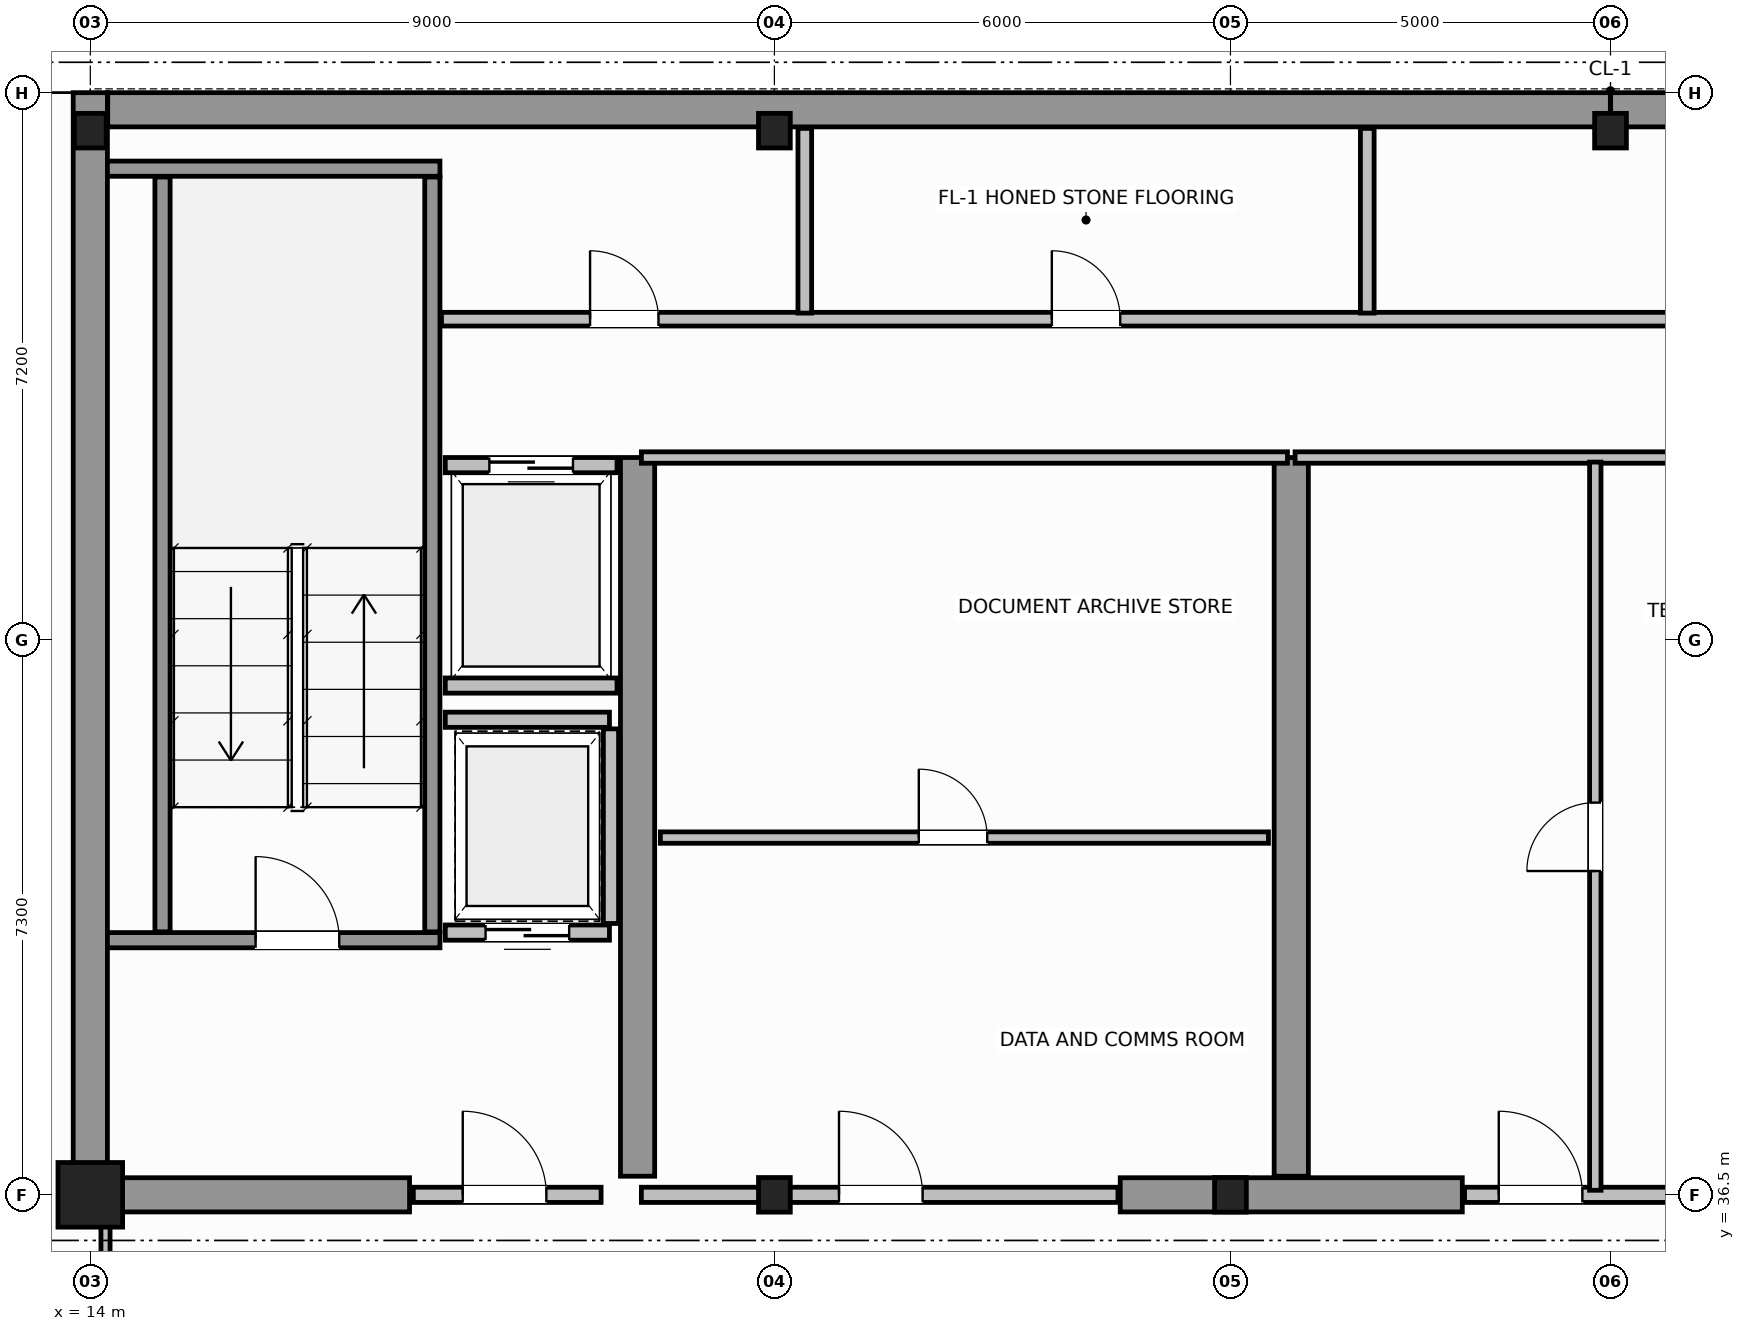
"""IFC4 building model, lengths in metres.
Left out: names, types, materials, properties, quantities, classifications, styles, units other than length and angle.
Written with IfcOpenShell. Run it as: python <this file> out.ifc"""

import sys

from ifc_helpers import new_model, si_unit, direction, frame, frame_2d, origin, origin_2d, place, context, subcontext, project, spatial, rectangle, i_section, extrude, source, transform, mapped, element, fill, save


model = new_model("IFC4")
c1 = context("Model", 3, precision=1e-05, world=origin(), true_north=direction((0.0, 1.0)))
c2 = subcontext(c1, "Body", "Model", "MODEL_VIEW")
j1 = project(units=[si_unit("LENGTHUNIT", "METRE"), si_unit("PLANEANGLEUNIT", "RADIAN")], contexts=[c1])
p1 = place(None, origin())
s1 = spatial("IfcSite", under=j1, at=p1, CompositionType="ELEMENT")
p2 = place(p1, origin())
s2 = spatial("IfcBuilding", under=s1, at=p2, CompositionType="ELEMENT")
p3 = place(p2, frame((0.0, 0.0, 268.8)))
s3 = spatial("IfcBuildingStorey", under=s2, at=p3, CompositionType="ELEMENT", Elevation=268.8)
m1 = source(origin(), c2, "Body", "SweptSolid", [
    extrude(rectangle(XDim=0.85, YDim=0.85, at=origin_2d()), origin(), (0.0, 0.0, 1.0), 3.8),
])
p4 = place(p3, frame((14.0, 36.5, 0.0), z_axis=(0.0, 0.0, 1.0), x_axis=(1.0, 0.0, 0.0)))
e1 = element("IfcColumn", 1, at=p4, inside=s3, PredefinedType="COLUMN", context=c2, shape_type="MappedRepresentation", body=[
    mapped(m1, transform((0.0, 0.0, 0.0), scale=1.0)),
])
m2 = source(origin(), c2, "Body", "SweptSolid", [
    extrude(i_section(OverallWidth=0.418, OverallDepth=0.455, WebThickness=0.042, FlangeThickness=0.058, FilletRadius=0.015, at=origin_2d()), origin(), (0.0, 0.0, 1.0), 3.8),
])
for number, where, z_axis, x_axis in (
    (2, (23.0, 36.5, 0.0), (0.0, 0.0, 1.0), (1.0, 0.0, 0.0)),
    (3, (29.0, 36.5, 0.0), (0.0, 0.0, 1.0), (1.0, 0.0, 0.0)),
    (4, (14.0, 50.5, 0.0), (0.0, 0.0, 1.0), (1.0, 0.0, 0.0)),
    (5, (23.0, 50.5, 0.0), (0.0, 0.0, 1.0), (1.0, 0.0, 0.0)),
    (6, (34.0, 50.5, 0.0), (0.0, 0.0, 1.0), (1.0, 0.0, 0.0)),
):
    element("IfcColumn", number, at=place(p3, frame(where, z_axis=z_axis, x_axis=x_axis)), inside=s3, PredefinedType="COLUMN", context=c2, shape_type="MappedRepresentation", body=[
        mapped(m2, transform((0.0, 0.0, 0.0), scale=1.0)),
    ])
for number, where, z_axis, x_axis in (
    (7, (14.229, 50.775, 0.0), (0.0, 0.0, 1.0), (1.0, 0.0, 0.0)),
    (8, (34.002, 50.775, 0.0), (0.0, 0.0, 1.0), (1.0, 0.0, 0.0)),
):
    element("IfcWall", number, at=place(p3, frame(where, z_axis=z_axis, x_axis=x_axis)), inside=s3, PredefinedType="SHEAR", context=c2, shape_type="SweptSolid", body=[
        extrude(rectangle(XDim=19.769, YDim=0.45, at=frame_2d((9.885, 0.0))), origin(), (0.0, 0.0, 1.0), 3.8),
    ])
p5 = place(p3, frame((14.0, 36.5, 0.0), z_axis=(0.0, 0.0, 1.0), x_axis=(0.0, 1.0, 0.0)))
e9 = element("IfcWall", 9, at=p5, inside=s3, PredefinedType="SHEAR", context=c2, shape_type="SweptSolid", body=[
    extrude(rectangle(XDim=14.5, YDim=0.45, at=frame_2d((7.25, 0.0))), origin(), (0.0, 0.0, 1.0), 3.8),
])
p6 = place(p3, frame((14.245, 36.5, 0.0), z_axis=(0.0, 0.0, 1.0), x_axis=(1.0, 0.0, 0.0)))
e10 = element("IfcWall", 10, at=p6, inside=s3, PredefinedType="SHEAR", context=c2, shape_type="SweptSolid", body=[
    extrude(rectangle(XDim=3.955, YDim=0.45, at=frame_2d((1.978, 0.0))), origin(), (0.0, 0.0, 1.0), 2.58),
])
p7 = place(p3, frame((27.55, 36.5, 0.0), z_axis=(0.0, 0.0, 1.0), x_axis=(1.0, 0.0, 0.0)))
e11 = element("IfcWall", 11, at=p7, inside=s3, PredefinedType="SHEAR", context=c2, shape_type="SweptSolid", body=[
    extrude(rectangle(XDim=4.5, YDim=0.45, at=frame_2d((2.25, 0.0))), origin(), (0.0, 0.0, 1.0), 3.8),
])
for number, where, z_axis, x_axis in (
    (12, (21.2, 36.745, 0.0), (0.0, 0.0, 1.0), (0.0, 1.0, 0.0)),
    (13, (29.8, 36.745, 0.0), (0.0, 0.0, 1.0), (0.0, 1.0, 0.0)),
):
    element("IfcWall", number, at=place(p3, frame(where, z_axis=z_axis, x_axis=x_axis)), inside=s3, PredefinedType="SHEAR", context=c2, shape_type="SweptSolid", body=[
        extrude(rectangle(XDim=9.455, YDim=0.45, at=frame_2d((4.728, 0.0))), origin(), (0.0, 0.0, 1.0), 3.8),
    ])
p8 = place(p3, frame((14.225, 39.85, 0.0), z_axis=(0.0, 0.0, 1.0), x_axis=(1.0, 0.0, 0.0)))
e14 = element("IfcWall", 14, at=p8, inside=s3, PredefinedType="SOLIDWALL", context=c2, shape_type="SweptSolid", body=[
    extrude(rectangle(XDim=4.375, YDim=0.2, at=frame_2d((2.188, 0.0))), origin(), (0.0, 0.0, 1.0), 3.8),
])
p9 = place(p8, frame((1.95, 0.0, 0.0)))
e15 = element("IfcOpeningElement", 15, at=p9, cuts=e14, PredefinedType="OPENING", context=c2, shape_type="SweptSolid", body=[
    extrude(rectangle(XDim=1.1, YDim=2.15, at=frame_2d((0.55, 1.075))), frame((0.0, 0.11, 0.0), z_axis=(0.0, -1.0, 0.0), x_axis=(1.0, 0.0, 0.0)), (0.0, 0.0, 1.0), 0.22),
])
p10 = place(p3, frame((14.225, 50.0, 0.0), z_axis=(0.0, 0.0, 1.0), x_axis=(1.0, 0.0, 0.0)))
e16 = element("IfcWall", 16, at=p10, inside=s3, PredefinedType="SOLIDWALL", context=c2, shape_type="SweptSolid", body=[
    extrude(rectangle(XDim=4.375, YDim=0.2, at=frame_2d((2.188, 0.0))), origin(), (0.0, 0.0, 1.0), 3.8),
])
for number, where, z_axis, x_axis in (
    (17, (14.95, 39.96, 0.0), (0.0, 0.0, 1.0), (0.0, 1.0, 0.0)),
    (18, (18.5, 39.96, 0.0), (0.0, 0.0, 1.0), (0.0, 1.0, 0.0)),
):
    element("IfcWall", number, at=place(p3, frame(where, z_axis=z_axis, x_axis=x_axis)), inside=s3, PredefinedType="SOLIDWALL", context=c2, shape_type="SweptSolid", body=[
        extrude(rectangle(XDim=9.93, YDim=0.2, at=frame_2d((4.965, 0.0))), origin(), (0.0, 0.0, 1.0), 3.8),
    ])
p11 = place(p3, frame((18.25, 36.5, 0.0), z_axis=(0.0, 0.0, 1.0), x_axis=(1.0, 0.0, 0.0)))
e19 = element("IfcWall", 19, at=p11, inside=s3, PredefinedType="SOLIDWALL", context=c2, shape_type="SweptSolid", body=[
    extrude(rectangle(XDim=2.47, YDim=0.2, at=frame_2d((1.235, 0.0))), origin(), (0.0, 0.0, 1.0), 2.57),
])
p12 = place(p11, frame((0.65, 0.0, 0.0)))
e20 = element("IfcOpeningElement", 20, at=p12, cuts=e19, PredefinedType="OPENING", context=c2, shape_type="SweptSolid", body=[
    extrude(rectangle(XDim=1.1, YDim=2.15, at=frame_2d((0.55, 1.075))), frame((0.0, 0.11, 0.0), z_axis=(0.0, -1.0, 0.0), x_axis=(1.0, 0.0, 0.0)), (0.0, 0.0, 1.0), 0.22),
])
p13 = place(p3, frame((18.67, 46.1, 0.0), z_axis=(0.0, 0.0, 1.0), x_axis=(1.0, 0.0, 0.0)))
e21 = element("IfcWall", 21, at=p13, inside=s3, PredefinedType="SOLIDWALL", context=c2, shape_type="SweptSolid", body=[
    extrude(rectangle(XDim=2.26, YDim=0.2, at=frame_2d((1.13, 0.0))), origin(), (0.0, 0.0, 1.0), 3.58),
])
p14 = place(p13, frame((0.58, 0.0, 0.0)))
e22 = element("IfcOpeningElement", 22, at=p14, cuts=e21, PredefinedType="OPENING", context=c2, shape_type="SweptSolid", body=[
    extrude(rectangle(XDim=1.1, YDim=2.15, at=frame_2d((0.55, 1.075))), frame((0.0, 0.11, 0.0), z_axis=(0.0, -1.0, 0.0), x_axis=(1.0, 0.0, 0.0)), (0.0, 0.0, 1.0), 0.22),
])
p15 = place(p3, frame((18.67, 43.2, 0.0), z_axis=(0.0, 0.0, 1.0), x_axis=(1.0, 0.0, 0.0)))
e23 = element("IfcWall", 23, at=p15, inside=s3, PredefinedType="SOLIDWALL", context=c2, shape_type="SweptSolid", body=[
    extrude(rectangle(XDim=2.26, YDim=0.2, at=frame_2d((1.13, 0.0))), origin(), (0.0, 0.0, 1.0), 3.58),
])
p16 = place(p3, frame((18.67, 39.95, 0.0), z_axis=(0.0, 0.0, 1.0), x_axis=(1.0, 0.0, 0.0)))
e24 = element("IfcWall", 24, at=p16, inside=s3, PredefinedType="SOLIDWALL", context=c2, shape_type="SweptSolid", body=[
    extrude(rectangle(XDim=2.16, YDim=0.2, at=frame_2d((1.08, 0.0))), origin(), (0.0, 0.0, 1.0), 3.58),
])
p17 = place(p16, frame((0.53, 0.0, 0.0)))
e25 = element("IfcOpeningElement", 25, at=p17, cuts=e24, PredefinedType="OPENING", context=c2, shape_type="SweptSolid", body=[
    extrude(rectangle(XDim=1.1, YDim=2.15, at=frame_2d((0.55, 1.075))), frame((0.0, 0.11, 0.0), z_axis=(0.0, -1.0, 0.0), x_axis=(1.0, 0.0, 0.0)), (0.0, 0.0, 1.0), 0.22),
])
p18 = place(p3, frame((18.67, 42.75, 0.0), z_axis=(0.0, 0.0, 1.0), x_axis=(1.0, 0.0, 0.0)))
e26 = element("IfcWall", 26, at=p18, inside=s3, PredefinedType="SOLIDWALL", context=c2, shape_type="SweptSolid", body=[
    extrude(rectangle(XDim=2.16, YDim=0.2, at=frame_2d((1.08, 0.0))), origin(), (0.0, 0.0, 1.0), 3.58),
])
p19 = place(p3, frame((20.85, 40.07, 0.0), z_axis=(0.0, 0.0, 1.0), x_axis=(0.0, 1.0, 0.0)))
e27 = element("IfcWall", 27, at=p19, inside=s3, PredefinedType="SOLIDWALL", context=c2, shape_type="SweptSolid", body=[
    extrude(rectangle(XDim=2.56, YDim=0.2, at=frame_2d((1.28, 0.0))), origin(), (0.0, 0.0, 1.0), 3.58),
])
p20 = place(p3, frame((21.25, 36.5, 0.0), z_axis=(0.0, 0.0, 1.0), x_axis=(1.0, 0.0, 0.0)))
e28 = element("IfcWall", 28, at=p20, inside=s3, PredefinedType="SOLIDWALL", context=c2, shape_type="SweptSolid", body=[
    extrude(rectangle(XDim=6.27, YDim=0.2, at=frame_2d((3.135, 0.0))), origin(), (0.0, 0.0, 1.0), 2.57),
])
p21 = place(p20, frame((2.6, 0.0, 0.0)))
e29 = element("IfcOpeningElement", 29, at=p21, cuts=e28, PredefinedType="OPENING", context=c2, shape_type="SweptSolid", body=[
    extrude(rectangle(XDim=1.1, YDim=2.15, at=frame_2d((0.55, 1.075))), frame((0.0, 0.11, 0.0), z_axis=(0.0, -1.0, 0.0), x_axis=(1.0, 0.0, 0.0)), (0.0, 0.0, 1.0), 0.22),
])
p22 = place(p3, frame((21.25, 46.2, 0.0), z_axis=(0.0, 0.0, 1.0), x_axis=(1.0, 0.0, 0.0)))
e30 = element("IfcWall", 30, at=p22, inside=s3, PredefinedType="PARTITIONING", context=c2, shape_type="SweptSolid", body=[
    extrude(rectangle(XDim=8.5, YDim=0.15, at=frame_2d((4.25, 0.0))), origin(), (0.0, 0.0, 1.0), 3.58),
])
p23 = place(p3, frame((21.5, 41.2, 0.0), z_axis=(0.0, 0.0, 1.0), x_axis=(1.0, 0.0, 0.0)))
e31 = element("IfcWall", 31, at=p23, inside=s3, PredefinedType="PARTITIONING", context=c2, shape_type="SweptSolid", body=[
    extrude(rectangle(XDim=8.0, YDim=0.15, at=frame_2d((4.0, 0.0))), origin(), (0.0, 0.0, 1.0), 3.58),
])
p24 = place(p23, frame((3.4, 0.0, 0.0)))
e32 = element("IfcOpeningElement", 32, at=p24, cuts=e31, PredefinedType="OPENING", context=c2, shape_type="SweptSolid", body=[
    extrude(rectangle(XDim=0.9, YDim=2.1, at=frame_2d((0.45, 1.05))), frame((0.0, 0.085, 0.0), z_axis=(0.0, -1.0, 0.0), x_axis=(1.0, 0.0, 0.0)), (0.0, 0.0, 1.0), 0.17),
])
p25 = place(p3, frame((32.08, 36.5, 0.0), z_axis=(0.0, 0.0, 1.0), x_axis=(1.0, 0.0, 0.0)))
e33 = element("IfcWall", 33, at=p25, inside=s3, PredefinedType="SOLIDWALL", context=c2, shape_type="SweptSolid", body=[
    extrude(rectangle(XDim=4.04, YDim=0.2, at=frame_2d((2.02, 0.0))), origin(), (0.0, 0.0, 1.0), 3.02),
])
p26 = place(p25, frame((0.45, 0.0, 0.0)))
e34 = element("IfcOpeningElement", 34, at=p26, cuts=e33, PredefinedType="OPENING", context=c2, shape_type="SweptSolid", body=[
    extrude(rectangle(XDim=1.1, YDim=2.15, at=frame_2d((0.55, 1.075))), frame((0.0, 0.11, 0.0), z_axis=(0.0, -1.0, 0.0), x_axis=(1.0, 0.0, 0.0)), (0.0, 0.0, 1.0), 0.22),
])
p27 = place(p3, frame((29.85, 46.2, 0.0), z_axis=(0.0, 0.0, 1.0), x_axis=(1.0, 0.0, 0.0)))
e35 = element("IfcWall", 35, at=p27, inside=s3, PredefinedType="PARTITIONING", context=c2, shape_type="SweptSolid", body=[
    extrude(rectangle(XDim=8.5, YDim=0.15, at=frame_2d((4.25, 0.0))), origin(), (0.0, 0.0, 1.0), 3.58),
])
p28 = place(p3, frame((33.8, 36.56, 0.0), z_axis=(0.0, 0.0, 1.0), x_axis=(0.0, 1.0, 0.0)))
e36 = element("IfcWall", 36, at=p28, inside=s3, PredefinedType="PARTITIONING", context=c2, shape_type="SweptSolid", body=[
    extrude(rectangle(XDim=9.58, YDim=0.15, at=frame_2d((4.79, 0.0))), origin(), (0.0, 0.0, 1.0), 3.58),
])
p29 = place(p28, frame((4.2, 0.0, 0.0)))
e37 = element("IfcOpeningElement", 37, at=p29, cuts=e36, PredefinedType="OPENING", context=c2, shape_type="SweptSolid", body=[
    extrude(rectangle(XDim=0.9, YDim=2.1, at=frame_2d((0.45, 1.05))), frame((0.0, 0.085, 0.0), z_axis=(0.0, -1.0, 0.0), x_axis=(1.0, 0.0, 0.0)), (0.0, 0.0, 1.0), 0.17),
])
p30 = place(p3, frame((18.62, 48.02, 0.0), z_axis=(0.0, 0.0, 1.0), x_axis=(1.0, 0.0, 0.0)))
e38 = element("IfcWall", 38, at=p30, inside=s3, PredefinedType="PLUMBINGWALL", context=c2, shape_type="SweptSolid", body=[
    extrude(rectangle(XDim=30.76, YDim=0.18, at=frame_2d((15.38, 0.0))), origin(), (0.0, 0.0, 1.0), 3.58),
])
p31 = place(p30, frame((1.955, 0.0, 0.0)))
e39 = element("IfcOpeningElement", 39, at=p31, cuts=e38, PredefinedType="OPENING", context=c2, shape_type="SweptSolid", body=[
    extrude(rectangle(XDim=0.9, YDim=2.15, at=frame_2d((0.45, 1.075))), frame((0.0, 0.1, 0.0), z_axis=(0.0, -1.0, 0.0), x_axis=(1.0, 0.0, 0.0)), (0.0, 0.0, 1.0), 0.2),
])
p32 = place(p30, frame((8.03, 0.0, 0.0)))
e40 = element("IfcOpeningElement", 40, at=p32, cuts=e38, PredefinedType="OPENING", context=c2, shape_type="SweptSolid", body=[
    extrude(rectangle(XDim=0.9, YDim=2.15, at=frame_2d((0.45, 1.075))), frame((0.0, 0.1, 0.0), z_axis=(0.0, -1.0, 0.0), x_axis=(1.0, 0.0, 0.0)), (0.0, 0.0, 1.0), 0.2),
])
p33 = place(p30, frame((16.93, 0.0, 0.0)))
e41 = element("IfcOpeningElement", 41, at=p33, cuts=e38, PredefinedType="OPENING", context=c2, shape_type="SweptSolid", body=[
    extrude(rectangle(XDim=0.9, YDim=2.15, at=frame_2d((0.45, 1.075))), frame((0.0, 0.1, 0.0), z_axis=(0.0, -1.0, 0.0), x_axis=(1.0, 0.0, 0.0)), (0.0, 0.0, 1.0), 0.2),
])
p34 = place(p30, frame((26.205, 0.0, 0.0)))
e42 = element("IfcOpeningElement", 42, at=p34, cuts=e38, PredefinedType="OPENING", context=c2, shape_type="SweptSolid", body=[
    extrude(rectangle(XDim=0.9, YDim=2.15, at=frame_2d((0.45, 1.075))), frame((0.0, 0.1, 0.0), z_axis=(0.0, -1.0, 0.0), x_axis=(1.0, 0.0, 0.0)), (0.0, 0.0, 1.0), 0.2),
])
for number, where, z_axis, x_axis in (
    (43, (23.4, 48.1, 0.0), (0.0, 0.0, 1.0), (0.0, 1.0, 0.0)),
    (44, (30.8, 48.1, 0.0), (0.0, 0.0, 1.0), (0.0, 1.0, 0.0)),
):
    element("IfcWall", number, at=place(p3, frame(where, z_axis=z_axis, x_axis=x_axis)), inside=s3, PredefinedType="PLUMBINGWALL", context=c2, shape_type="SweptSolid", body=[
        extrude(rectangle(XDim=2.43, YDim=0.18, at=frame_2d((1.215, 0.0))), origin(), (0.0, 0.0, 1.0), 3.58),
    ])
p35 = place(p3, frame((14.2, 34.0, 0.0), z_axis=(0.0, 0.0, 1.0), x_axis=(0.0, 1.0, 0.0)))
e45 = element("IfcWall", 45, at=p35, inside=s3, PredefinedType="PARTITIONING", context=c2, shape_type="SweptSolid", body=[
    extrude(rectangle(XDim=2.44, YDim=0.12, at=frame_2d((1.22, 0.0))), origin(), (0.0, 0.0, 1.0), 3.58),
])
p36 = place(p35, frame((0.7, 0.0, 0.0)))
e46 = element("IfcOpeningElement", 46, at=p36, cuts=e45, PredefinedType="OPENING", context=c2, shape_type="SweptSolid", body=[
    extrude(rectangle(XDim=0.9, YDim=2.15, at=frame_2d((0.45, 1.075))), frame((0.0, 0.07, 0.0), z_axis=(0.0, -1.0, 0.0), x_axis=(1.0, 0.0, 0.0)), (0.0, 0.0, 1.0), 0.14),
])
m3 = source(origin(), c2, "Body", "SweptSolid", [
    extrude(rectangle(XDim=1.1, YDim=2.15, at=frame_2d((0.55, 1.075))), frame((0.0, 0.025, 0.0), z_axis=(0.0, -1.0, 0.0), x_axis=(1.0, 0.0, 0.0)), (0.0, 0.0, 1.0), 0.05),
])
p37 = place(p9, origin())
e47 = element("IfcDoor", 47, at=p37, inside=s3, OperationType="SINGLE_SWING_LEFT", PredefinedType="DOOR", context=c2, shape_type="MappedRepresentation", body=[
    mapped(m3, transform((0.0, 0.0, 0.0), scale=1.0)),
])
fill(e15, e47)
p38 = place(p12, origin())
e48 = element("IfcDoor", 48, at=p38, inside=s3, OperationType="SINGLE_SWING_RIGHT", PredefinedType="DOOR", context=c2, shape_type="MappedRepresentation", body=[
    mapped(m3, transform((0.0, 0.0, 0.0), scale=1.0)),
])
fill(e20, e48)
p39 = place(p14, origin())
e49 = element("IfcDoor", 49, at=p39, inside=s3, OperationType="DOUBLE_DOOR_SLIDING", PredefinedType="DOOR", context=c2, shape_type="MappedRepresentation", body=[
    mapped(m3, transform((0.0, 0.0, 0.0), scale=1.0)),
])
fill(e22, e49)
p40 = place(p17, origin())
e50 = element("IfcDoor", 50, at=p40, inside=s3, OperationType="DOUBLE_DOOR_SLIDING", PredefinedType="DOOR", context=c2, shape_type="MappedRepresentation", body=[
    mapped(m3, transform((0.0, 0.0, 0.0), scale=1.0)),
])
fill(e25, e50)
p41 = place(p21, origin())
e51 = element("IfcDoor", 51, at=p41, inside=s3, OperationType="SINGLE_SWING_LEFT", PredefinedType="DOOR", context=c2, shape_type="MappedRepresentation", body=[
    mapped(m3, transform((0.0, 0.0, 0.0), scale=1.0)),
])
fill(e29, e51)
m4 = source(origin(), c2, "Body", "SweptSolid", [
    extrude(rectangle(XDim=0.9, YDim=2.1, at=frame_2d((0.45, 1.05))), frame((0.0, 0.025, 0.0), z_axis=(0.0, -1.0, 0.0), x_axis=(1.0, 0.0, 0.0)), (0.0, 0.0, 1.0), 0.05),
])
p42 = place(p24, origin())
e52 = element("IfcDoor", 52, at=p42, inside=s3, OperationType="SINGLE_SWING_RIGHT", PredefinedType="DOOR", context=c2, shape_type="MappedRepresentation", body=[
    mapped(m4, transform((0.0, 0.0, 0.0), scale=1.0)),
])
fill(e32, e52)
p43 = place(p26, origin())
e53 = element("IfcDoor", 53, at=p43, inside=s3, OperationType="SINGLE_SWING_LEFT", PredefinedType="DOOR", context=c2, shape_type="MappedRepresentation", body=[
    mapped(m3, transform((0.0, 0.0, 0.0), scale=1.0)),
])
fill(e34, e53)
p44 = place(p29, origin())
e54 = element("IfcDoor", 54, at=p44, inside=s3, OperationType="SINGLE_SWING_RIGHT", PredefinedType="DOOR", context=c2, shape_type="MappedRepresentation", body=[
    mapped(m4, transform((0.0, 0.0, 0.0), scale=1.0)),
])
fill(e37, e54)
m5 = source(origin(), c2, "Body", "SweptSolid", [
    extrude(rectangle(XDim=0.9, YDim=2.15, at=frame_2d((0.45, 1.075))), frame((0.0, 0.025, 0.0), z_axis=(0.0, -1.0, 0.0), x_axis=(1.0, 0.0, 0.0)), (0.0, 0.0, 1.0), 0.05),
])
p45 = place(p31, origin())
e55 = element("IfcDoor", 55, at=p45, inside=s3, OperationType="SINGLE_SWING_LEFT", PredefinedType="DOOR", context=c2, shape_type="MappedRepresentation", body=[
    mapped(m5, transform((0.0, 0.0, 0.0), scale=1.0)),
])
fill(e39, e55)
p46 = place(p32, origin())
e56 = element("IfcDoor", 56, at=p46, inside=s3, OperationType="SINGLE_SWING_RIGHT", PredefinedType="DOOR", context=c2, shape_type="MappedRepresentation", body=[
    mapped(m5, transform((0.0, 0.0, 0.0), scale=1.0)),
])
fill(e40, e56)
save(model, sys.argv[1])
